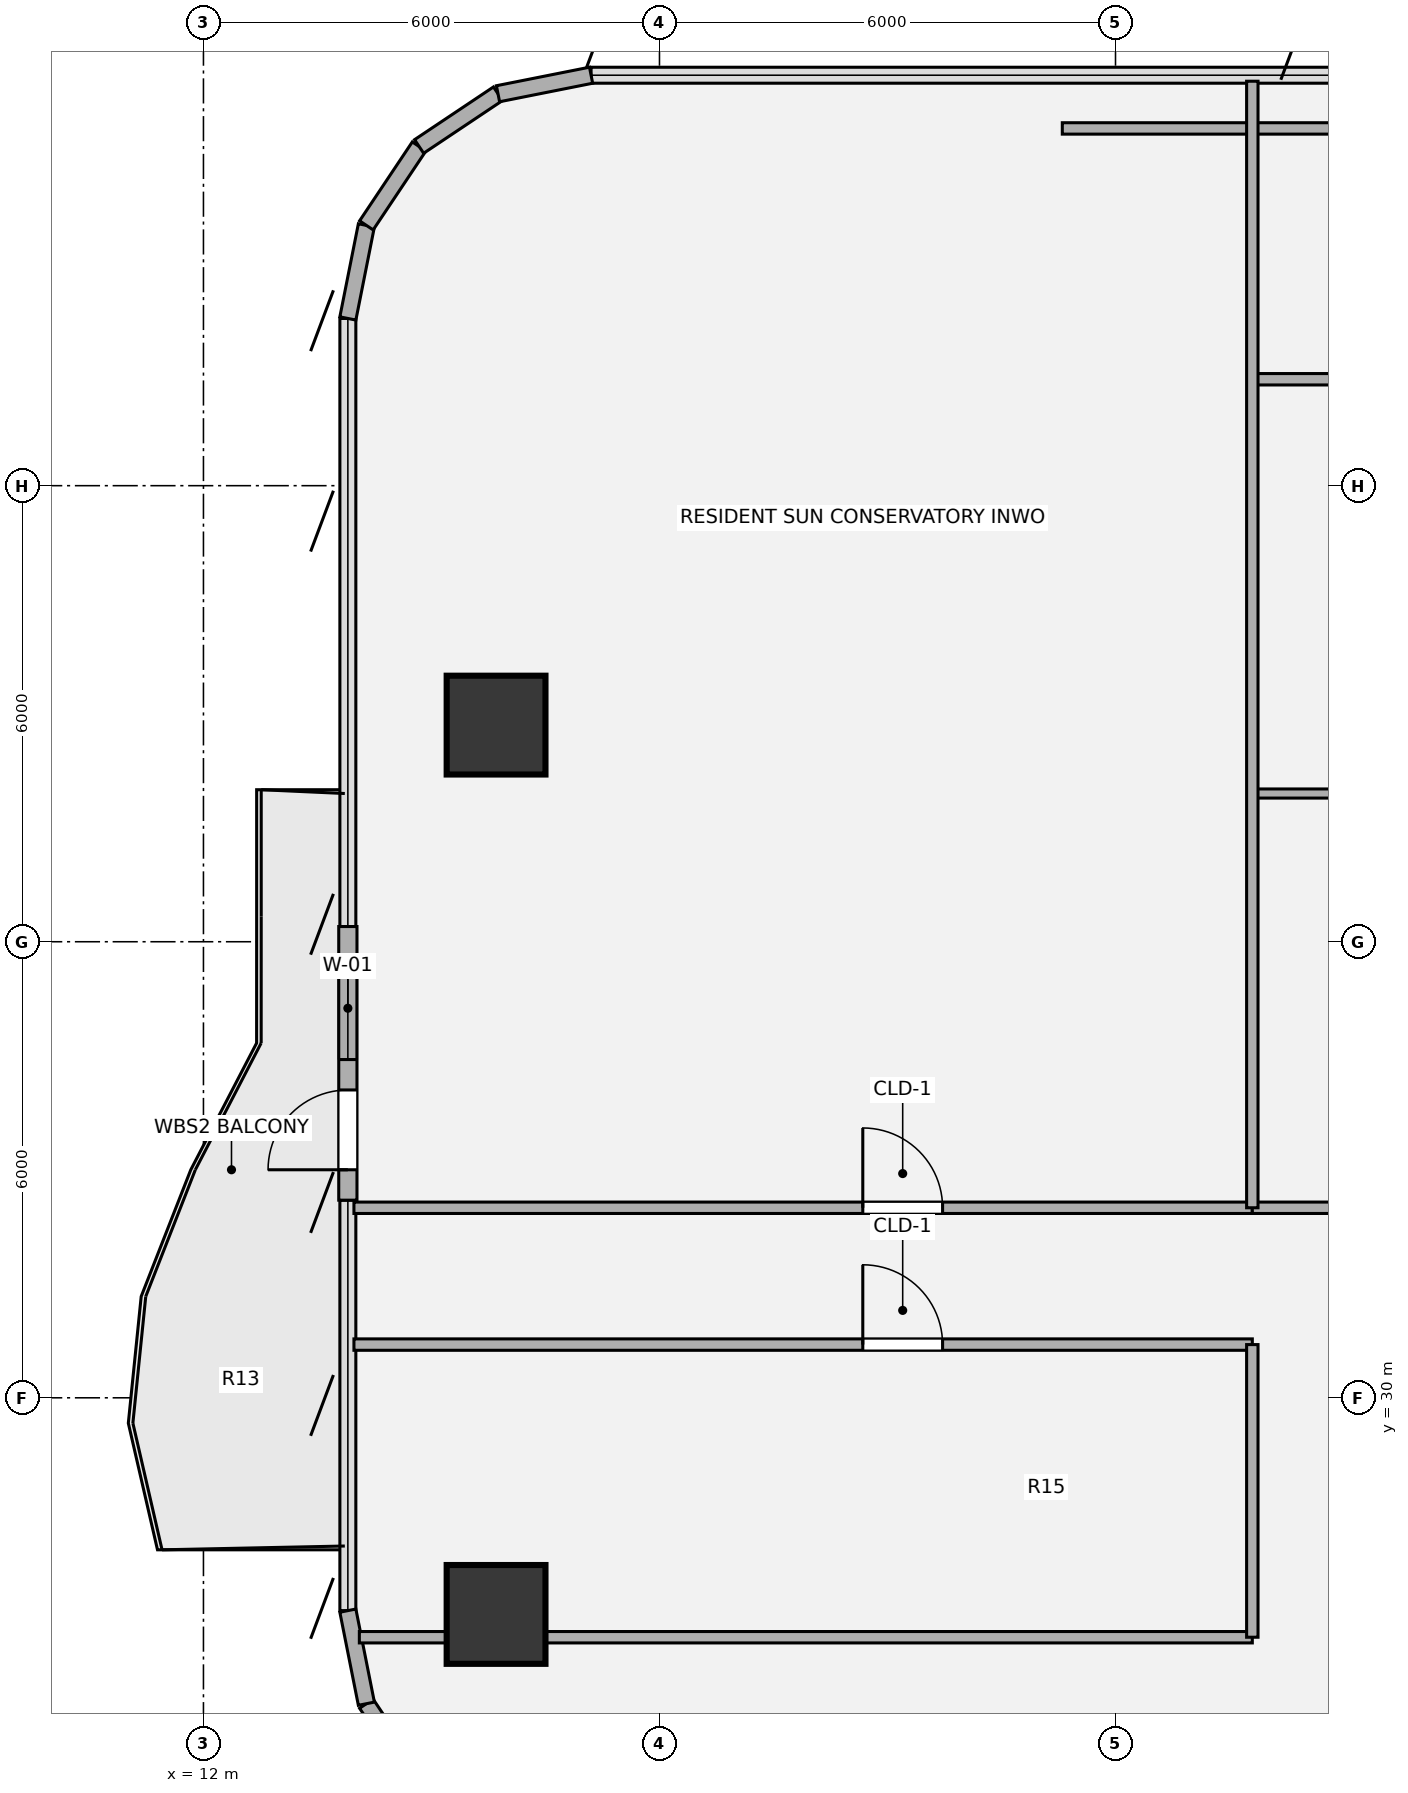
"""IFC4 building model, lengths in metres.
Left out: names, types, materials, properties, quantities, classifications, styles, units other than length and angle.
Written with IfcOpenShell. Run it as: python <this file> out.ifc"""

import sys

from ifc_helpers import new_model, si_unit, direction, frame, frame_2d, origin, origin_2d, place, context, subcontext, project, spatial, rectangle, hollow_circle, extrude, source, transform, mapped, element, fill, save


model = new_model("IFC4")
c1 = context("Model", 3, precision=1e-05, world=origin(), true_north=direction((0.0, 1.0)))
c2 = subcontext(c1, "Body", "Model", "MODEL_VIEW")
j1 = project(units=[si_unit("LENGTHUNIT", "METRE"), si_unit("PLANEANGLEUNIT", "RADIAN")], contexts=[c1])
p1 = place(None, origin())
s1 = spatial("IfcSite", under=j1, at=p1, CompositionType="ELEMENT")
p2 = place(p1, origin())
s2 = spatial("IfcBuilding", under=s1, at=p2, CompositionType="ELEMENT")
p3 = place(p2, frame((0.0, 0.0, 138.96)))
s3 = spatial("IfcBuildingStorey", under=s2, at=p3, CompositionType="ELEMENT", Elevation=138.96)
m1 = source(origin(), c2, "Body", "SweptSolid", [
    extrude(hollow_circle(Radius=0.65, WallThickness=0.045, at=origin_2d()), origin(), (0.0, 0.0, 1.0), 3.78),
])
for number, where, z_axis, x_axis in (
    (1, (15.85, 27.15, 0.0), (0.0, 0.0, 1.0), (1.0, 0.0, 0.0)),
    (2, (15.85, 38.85, 0.0), (0.0, 0.0, 1.0), (1.0, 0.0, 0.0)),
):
    element("IfcColumn", number, at=place(p3, frame(where, z_axis=z_axis, x_axis=x_axis)), inside=s3, PredefinedType="COLUMN", context=c2, shape_type="MappedRepresentation", body=[
        mapped(m1, transform((0.0, 0.0, 0.0), x_axis=(1.0, 0.0, 0.0), y_axis=(0.0, 1.0, 0.0), z_axis=(0.0, 0.0, 1.0), scale=1.0)),
    ])
for number, where, z_axis, x_axis in (
    (3, (14.837, 24.937, 0.0), (0.0, 0.0, 1.0), (-0.556, 0.831, 0.0)),
    (4, (14.144, 25.975, 0.0), (0.0, 0.0, 1.0), (-0.195, 0.981, 0.0)),
):
    element("IfcWall", number, at=place(p3, frame(where, z_axis=z_axis, x_axis=x_axis)), inside=s3, PredefinedType="SOLIDWALL", context=c2, shape_type="SweptSolid", body=[
        extrude(rectangle(XDim=1.249, YDim=0.215, at=frame_2d((0.624, 0.0))), origin(), (0.0, 0.0, 1.0), 3.53),
    ])
p4 = place(p3, frame((13.9, 32.6, 0.0), z_axis=(0.0, 0.0, 1.0), x_axis=(0.0, 1.0, 0.0)))
e5 = element("IfcWall", 5, at=p4, inside=s3, PredefinedType="SOLIDWALL", context=c2, shape_type="SweptSolid", body=[
    extrude(rectangle(XDim=3.6, YDim=0.24, at=frame_2d((1.8, 0.0))), origin(), (0.0, 0.0, 1.0), 3.53),
])
p5 = place(p4, frame((0.4, 0.0, 0.0)))
e6 = element("IfcOpeningElement", 6, at=p5, cuts=e5, PredefinedType="OPENING", context=c2, shape_type="SweptSolid", body=[
    extrude(rectangle(XDim=1.05, YDim=2.15, at=origin_2d()), frame((0.525, 0.13, 1.075), z_axis=(0.0, -1.0, 0.0), x_axis=(1.0, 0.0, 0.0)), (0.0, 0.0, 1.0), 0.26),
])
p6 = place(p4, frame((1.85, 0.0, 0.85)))
e7 = element("IfcOpeningElement", 7, at=p6, cuts=e5, PredefinedType="OPENING", context=c2, shape_type="SweptSolid", body=[
    extrude(rectangle(XDim=1.35, YDim=1.35, at=origin_2d()), frame((0.675, 0.13, 0.675), z_axis=(0.0, -1.0, 0.0), x_axis=(1.0, 0.0, 0.0)), (0.0, 0.0, 1.0), 0.26),
])
for number, where, z_axis, x_axis in (
    (8, (13.9, 44.2, 0.0), (0.0, 0.0, 1.0), (0.195, 0.981, 0.0)),
    (9, (14.144, 45.425, 0.0), (0.0, 0.0, 1.0), (0.556, 0.831, 0.0)),
    (10, (14.837, 46.463, 0.0), (0.0, 0.0, 1.0), (0.831, 0.556, 0.0)),
    (11, (15.875, 47.156, 0.0), (0.0, 0.0, 1.0), (0.981, 0.195, 0.0)),
):
    element("IfcWall", number, at=place(p3, frame(where, z_axis=z_axis, x_axis=x_axis)), inside=s3, PredefinedType="SOLIDWALL", context=c2, shape_type="SweptSolid", body=[
        extrude(rectangle(XDim=1.249, YDim=0.215, at=frame_2d((0.624, 0.0))), origin(), (0.0, 0.0, 1.0), 3.53),
    ])
p7 = place(p3, frame((14.051, 26.85, 0.0), z_axis=(0.0, 0.0, 1.0), x_axis=(1.0, 0.0, 0.0)))
e12 = element("IfcWall", 12, at=p7, inside=s3, PredefinedType="PARTITIONING", context=c2, shape_type="SweptSolid", body=[
    extrude(rectangle(XDim=11.749, YDim=0.15, at=frame_2d((5.875, 0.0))), origin(), (0.0, 0.0, 1.0), 3.055),
])
p8 = place(p3, frame((13.98, 30.7, 0.0), z_axis=(0.0, 0.0, 1.0), x_axis=(1.0, 0.0, 0.0)))
e13 = element("IfcWall", 13, at=p8, inside=s3, PredefinedType="PARTITIONING", context=c2, shape_type="SweptSolid", body=[
    extrude(rectangle(XDim=11.82, YDim=0.15, at=frame_2d((5.91, 0.0))), origin(), (0.0, 0.0, 1.0), 3.055),
])
p9 = place(p8, frame((6.695, 0.0, 0.0)))
e14 = element("IfcOpeningElement", 14, at=p9, cuts=e13, PredefinedType="OPENING", context=c2, shape_type="SweptSolid", body=[
    extrude(rectangle(XDim=1.05, YDim=2.1, at=origin_2d()), frame((0.525, 0.085, 1.05), z_axis=(0.0, -1.0, 0.0), x_axis=(1.0, 0.0, 0.0)), (0.0, 0.0, 1.0), 0.17),
])
p10 = place(p3, frame((13.98, 32.5, 0.0), z_axis=(0.0, 0.0, 1.0), x_axis=(1.0, 0.0, 0.0)))
e15 = element("IfcWall", 15, at=p10, inside=s3, PredefinedType="PARTITIONING", context=c2, shape_type="SweptSolid", body=[
    extrude(rectangle(XDim=11.82, YDim=0.15, at=frame_2d((5.91, 0.0))), origin(), (0.0, 0.0, 1.0), 2.982),
])
p11 = place(p10, frame((6.695, 0.0, 0.0)))
e16 = element("IfcOpeningElement", 16, at=p11, cuts=e15, PredefinedType="OPENING", context=c2, shape_type="SweptSolid", body=[
    extrude(rectangle(XDim=1.05, YDim=2.1, at=origin_2d()), frame((0.525, 0.085, 1.05), z_axis=(0.0, -1.0, 0.0), x_axis=(1.0, 0.0, 0.0)), (0.0, 0.0, 1.0), 0.17),
])
p12 = place(p3, frame((25.8, 32.5, 0.0), z_axis=(0.0, 0.0, 1.0), x_axis=(1.0, 0.0, 0.0)))
e17 = element("IfcWall", 17, at=p12, inside=s3, PredefinedType="PARTITIONING", context=c2, shape_type="SweptSolid", body=[
    extrude(rectangle(XDim=9.3, YDim=0.15, at=frame_2d((4.65, 0.0))), origin(), (0.0, 0.0, 1.0), 2.982),
])
p13 = place(p3, frame((25.8, 37.95, 0.0), z_axis=(0.0, 0.0, 1.0), x_axis=(1.0, 0.0, 0.0)))
e18 = element("IfcWall", 18, at=p13, inside=s3, PredefinedType="PARTITIONING", context=c2, shape_type="SweptSolid", body=[
    extrude(rectangle(XDim=3.65, YDim=0.12, at=frame_2d((1.825, 0.0))), origin(), (0.0, 0.0, 1.0), 2.982),
])
p14 = place(p3, frame((25.8, 43.4, 0.0), z_axis=(0.0, 0.0, 1.0), x_axis=(1.0, 0.0, 0.0)))
e19 = element("IfcWall", 19, at=p14, inside=s3, PredefinedType="PARTITIONING", context=c2, shape_type="SweptSolid", body=[
    extrude(rectangle(XDim=9.3, YDim=0.15, at=frame_2d((4.65, 0.0))), origin(), (0.0, 0.0, 1.0), 3.308),
])
p15 = place(p3, frame((23.3, 46.7, 0.0), z_axis=(0.0, 0.0, 1.0), x_axis=(1.0, 0.0, 0.0)))
e20 = element("IfcWall", 20, at=p15, inside=s3, PredefinedType="PARTITIONING", context=c2, shape_type="SweptSolid", body=[
    extrude(rectangle(XDim=11.8, YDim=0.15, at=frame_2d((5.9, 0.0))), origin(), (0.0, 0.0, 1.0), 3.308),
])
p16 = place(p3, frame((25.8, 26.85, 0.0), z_axis=(0.0, 0.0, 1.0), x_axis=(0.0, 1.0, 0.0)))
e21 = element("IfcWall", 21, at=p16, inside=s3, PredefinedType="PARTITIONING", context=c2, shape_type="SweptSolid", body=[
    extrude(rectangle(XDim=3.85, YDim=0.15, at=frame_2d((1.925, 0.0))), origin(), (0.0, 0.0, 1.0), 3.5),
])
p17 = place(p3, frame((25.8, 32.5, 0.0), z_axis=(0.0, 0.0, 1.0), x_axis=(0.0, 1.0, 0.0)))
e22 = element("IfcWall", 22, at=p17, inside=s3, PredefinedType="PARTITIONING", context=c2, shape_type="SweptSolid", body=[
    extrude(rectangle(XDim=14.821, YDim=0.15, at=frame_2d((7.411, 0.0))), origin(), (0.0, 0.0, 1.0), 3.5),
])
m2 = source(origin(), c2, "Body", "SweptSolid", [
    extrude(rectangle(XDim=1.05, YDim=2.15, at=origin_2d()), frame((0.525, 0.025, 1.075), z_axis=(0.0, -1.0, 0.0), x_axis=(1.0, 0.0, 0.0)), (0.0, 0.0, 1.0), 0.05),
])
p18 = place(p5, origin())
e23 = element("IfcDoor", 23, at=p18, inside=s3, OperationType="SINGLE_SWING_LEFT", PredefinedType="DOOR", context=c2, shape_type="MappedRepresentation", body=[
    mapped(m2, transform((0.0, 0.0, 0.0), x_axis=(1.0, 0.0, 0.0), y_axis=(0.0, 1.0, 0.0), z_axis=(0.0, 0.0, 1.0), scale=1.0)),
])
fill(e6, e23)
m3 = source(origin(), c2, "Body", "SweptSolid", [
    extrude(rectangle(XDim=1.35, YDim=1.35, at=origin_2d()), frame((0.675, 0.03, 0.675), z_axis=(0.0, -1.0, 0.0), x_axis=(1.0, 0.0, 0.0)), (0.0, 0.0, 1.0), 0.06),
])
p19 = place(p6, origin())
e24 = element("IfcWindow", 24, at=p19, inside=s3, PartitioningType="SINGLE_PANEL", PredefinedType="WINDOW", context=c2, shape_type="MappedRepresentation", body=[
    mapped(m3, transform((0.0, 0.0, 0.0), x_axis=(1.0, 0.0, 0.0), y_axis=(0.0, 1.0, 0.0), z_axis=(0.0, 0.0, 1.0), scale=1.0)),
])
fill(e7, e24)
m4 = source(origin(), c2, "Body", "SweptSolid", [
    extrude(rectangle(XDim=1.05, YDim=2.1, at=origin_2d()), frame((0.525, 0.025, 1.05), z_axis=(0.0, -1.0, 0.0), x_axis=(1.0, 0.0, 0.0)), (0.0, 0.0, 1.0), 0.05),
])
p20 = place(p9, origin())
e25 = element("IfcDoor", 25, at=p20, inside=s3, OperationType="SINGLE_SWING_LEFT", PredefinedType="DOOR", context=c2, shape_type="MappedRepresentation", body=[
    mapped(m4, transform((0.0, 0.0, 0.0), x_axis=(1.0, 0.0, 0.0), y_axis=(0.0, 1.0, 0.0), z_axis=(0.0, 0.0, 1.0), scale=1.0)),
])
fill(e14, e25)
p21 = place(p11, origin())
e26 = element("IfcDoor", 26, at=p21, inside=s3, OperationType="SINGLE_SWING_LEFT", PredefinedType="DOOR", context=c2, shape_type="MappedRepresentation", body=[
    mapped(m4, transform((0.0, 0.0, 0.0), x_axis=(1.0, 0.0, 0.0), y_axis=(0.0, 1.0, 0.0), z_axis=(0.0, 0.0, 1.0), scale=1.0)),
])
fill(e16, e26)
save(model, sys.argv[1])
